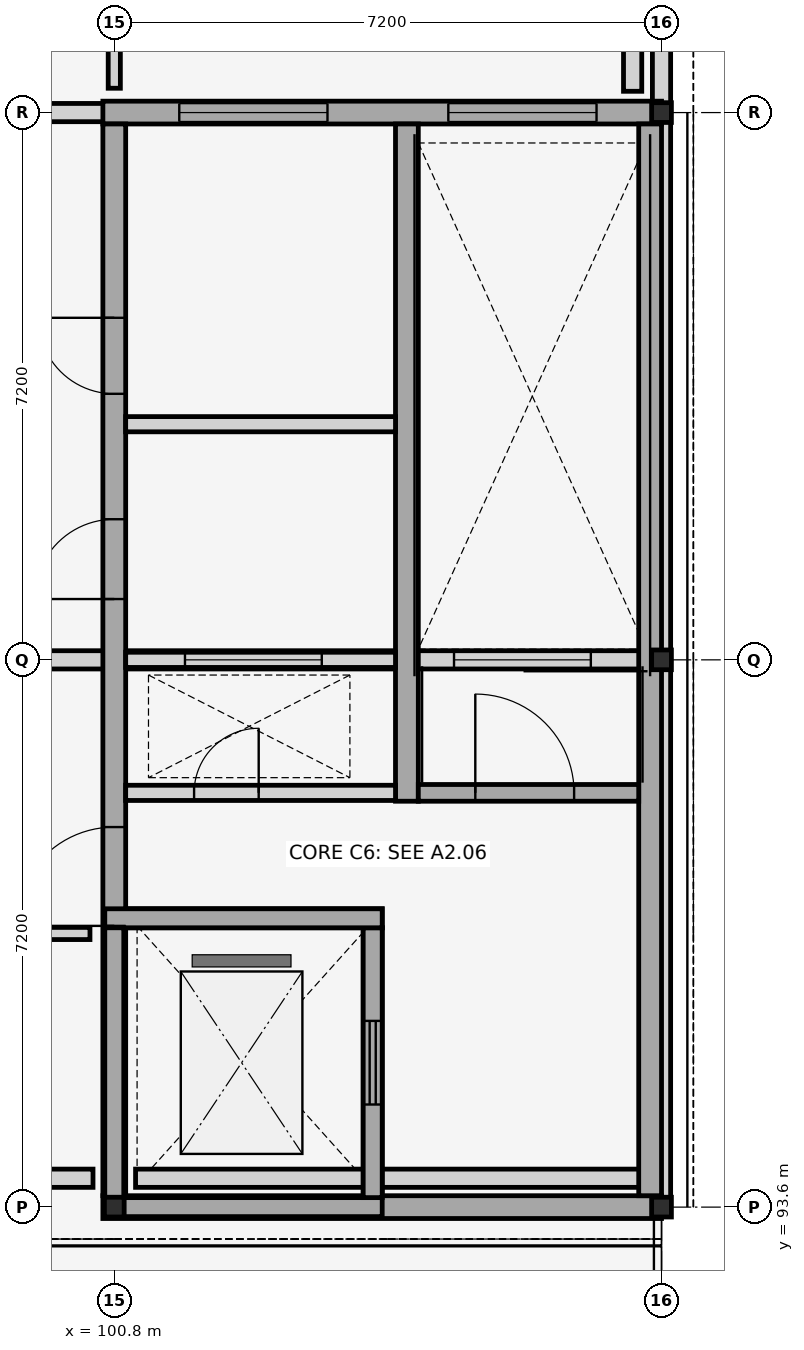
"""IFC4 building model, lengths in metres.
Left out: names, types, materials, properties, quantities, classifications, styles, units other than length and angle.
Written with IfcOpenShell. Run it as: python <this file> out.ifc"""

import sys

from ifc_helpers import new_model, si_unit, direction, frame, frame_2d, origin, origin_2d, place, context, subcontext, project, spatial, polyline, rectangle, i_section, outline, extrude, element, fill, save


model = new_model("IFC4")
c1 = context("Model", 3, precision=1e-05, world=origin(), true_north=direction((0.0, 1.0)))
c2 = subcontext(c1, "Body", "Model", "MODEL_VIEW")
j1 = project(units=[si_unit("LENGTHUNIT", "METRE"), si_unit("PLANEANGLEUNIT", "RADIAN")], contexts=[c1])
p1 = place(None, origin())
s1 = spatial("IfcSite", under=j1, at=p1, CompositionType="ELEMENT")
p2 = place(p1, origin())
s2 = spatial("IfcBuilding", under=s1, at=p2, CompositionType="ELEMENT")
p3 = place(p2, frame((0.0, 0.0, 25.2)))
s3 = spatial("IfcBuildingStorey", under=s2, at=p3, CompositionType="ELEMENT", Elevation=25.2)
for number, where, z_axis, x_axis in (
    (1, (100.8, 93.6, 0.0), (0.0, 0.0, 1.0), (1.0, 0.0, 0.0)),
    (2, (108.0, 93.6, 0.0), (0.0, 0.0, 1.0), (0.0, 1.0, 0.0)),
    (3, (108.0, 100.8, 0.0), (0.0, 0.0, 1.0), (1.0, 0.0, 0.0)),
    (4, (108.0, 108.0, 0.0), (0.0, 0.0, 1.0), (0.0, 1.0, 0.0)),
):
    element("IfcColumn", number, at=place(p3, frame(where, z_axis=z_axis, x_axis=x_axis)), inside=s3, PredefinedType="COLUMN", context=c2, shape_type="SweptSolid", body=[
        extrude(i_section(OverallWidth=0.26, OverallDepth=0.26, WebThickness=0.01, FlangeThickness=0.018, FilletRadius=0.024, at=origin_2d()), origin(), (0.0, 0.0, 1.0), 5.4),
    ])
p4 = place(p3, frame((93.88, 93.98, 0.0), z_axis=(0.0, 0.0, 1.0), x_axis=(1.0, 0.0, 0.0)))
e5 = element("IfcWall", 5, at=p4, inside=s3, PredefinedType="STANDARD", context=c2, shape_type="SweptSolid", body=[
    extrude(rectangle(XDim=6.64, YDim=0.24, at=frame_2d((3.32, 0.0))), origin(), (0.0, 0.0, 1.0), 4.78),
])
for number, where, z_axis, x_axis in (
    (6, (101.08, 93.98, 0.0), (0.0, 0.0, 1.0), (1.0, 0.0, 0.0)),
    (7, (107.62, 108.28, 0.0), (0.0, 0.0, 1.0), (0.0, 1.0, 0.0)),
):
    element("IfcWall", number, at=place(p3, frame(where, z_axis=z_axis, x_axis=x_axis)), inside=s3, PredefinedType="STANDARD", context=c2, shape_type="SweptSolid", body=[
        extrude(rectangle(XDim=6.64, YDim=0.24, at=frame_2d((3.32, 0.0))), origin(), (0.0, 0.0, 1.0), 4.78),
    ])
p5 = place(p3, frame((100.74, 100.8, 5.42), z_axis=(0.0, 0.0, 1.0), x_axis=(-1.0, 0.0, 0.0)))
e8 = element("IfcWall", 8, at=p5, inside=s3, PredefinedType="STANDARD", context=c2, shape_type="SweptSolid", body=[
    extrude(rectangle(XDim=7.08, YDim=0.24, at=frame_2d((3.54, 0.0))), origin(), (0.0, 0.0, 1.0), 6.46),
])
p6 = place(p5, frame((0.97, 0.0, 0.7)))
e9 = element("IfcOpeningElement", 9, at=p6, cuts=e8, PredefinedType="OPENING", context=c2, shape_type="SweptSolid", body=[
    extrude(rectangle(XDim=1.6, YDim=2.2, at=frame_2d((0.8, 1.1))), frame((0.0, 0.13, 0.0), z_axis=(0.0, -1.0, 0.0), x_axis=(1.0, 0.0, 0.0)), (0.0, 0.0, 1.0), 0.26),
])
p7 = place(p5, frame((4.51, 0.0, 0.7)))
e10 = element("IfcOpeningElement", 10, at=p7, cuts=e8, PredefinedType="OPENING", context=c2, shape_type="SweptSolid", body=[
    extrude(rectangle(XDim=1.6, YDim=2.2, at=frame_2d((0.8, 1.1))), frame((0.0, 0.13, 0.0), z_axis=(0.0, -1.0, 0.0), x_axis=(1.0, 0.0, 0.0)), (0.0, 0.0, 1.0), 0.26),
])
p8 = place(p3, frame((107.94, 100.8, 5.42), z_axis=(0.0, 0.0, 1.0), x_axis=(-1.0, 0.0, 0.0)))
e11 = element("IfcWall", 11, at=p8, inside=s3, PredefinedType="STANDARD", context=c2, shape_type="SweptSolid", body=[
    extrude(rectangle(XDim=7.08, YDim=0.24, at=frame_2d((3.54, 0.0))), origin(), (0.0, 0.0, 1.0), 6.46),
])
p9 = place(p8, frame((0.87, 0.0, 0.7)))
e12 = element("IfcOpeningElement", 12, at=p9, cuts=e11, PredefinedType="OPENING", context=c2, shape_type="SweptSolid", body=[
    extrude(rectangle(XDim=1.8, YDim=2.4, at=frame_2d((0.9, 1.2))), frame((0.0, 0.13, 0.0), z_axis=(0.0, -1.0, 0.0), x_axis=(1.0, 0.0, 0.0)), (0.0, 0.0, 1.0), 0.26),
])
p10 = place(p8, frame((4.41, 0.0, 0.7)))
e13 = element("IfcOpeningElement", 13, at=p10, cuts=e11, PredefinedType="OPENING", context=c2, shape_type="SweptSolid", body=[
    extrude(rectangle(XDim=1.8, YDim=2.4, at=frame_2d((0.9, 1.2))), frame((0.0, 0.13, 0.0), z_axis=(0.0, -1.0, 0.0), x_axis=(1.0, 0.0, 0.0)), (0.0, 0.0, 1.0), 0.26),
])
p11 = place(p3, frame((108.0, 93.6, 5.42), z_axis=(0.0, 0.0, 1.0), x_axis=(0.0, 1.0, 0.0)))
e14 = element("IfcWall", 14, at=p11, inside=s3, PredefinedType="STANDARD", context=c2, shape_type="SweptSolid", body=[
    extrude(outline(polyline([(0.0, 0.0), (7.2, 0.0), (7.2, 6.46), (0.0, 0.13), (0.0, 0.0)])), frame((0.0, 0.12, 0.0), z_axis=(0.0, -1.0, 0.0), x_axis=(1.0, 0.0, 0.0)), (0.0, 0.0, 1.0), 0.24),
])
p12 = place(p3, frame((100.74, 108.0, 5.42), z_axis=(0.0, 0.0, 1.0), x_axis=(-1.0, 0.0, 0.0)))
e15 = element("IfcWall", 15, at=p12, inside=s3, PredefinedType="STANDARD", context=c2, shape_type="SweptSolid", body=[
    extrude(rectangle(XDim=7.08, YDim=0.24, at=frame_2d((3.54, 0.0))), origin(), (0.0, 0.0, 1.0), 6.46),
])
p13 = place(p12, frame((0.87, 0.0, 0.7)))
e16 = element("IfcOpeningElement", 16, at=p13, cuts=e15, PredefinedType="OPENING", context=c2, shape_type="SweptSolid", body=[
    extrude(rectangle(XDim=1.8, YDim=2.4, at=frame_2d((0.9, 1.2))), frame((0.0, 0.13, 0.0), z_axis=(0.0, -1.0, 0.0), x_axis=(1.0, 0.0, 0.0)), (0.0, 0.0, 1.0), 0.26),
])
p14 = place(p12, frame((4.41, 0.0, 0.7)))
e17 = element("IfcOpeningElement", 17, at=p14, cuts=e15, PredefinedType="OPENING", context=c2, shape_type="SweptSolid", body=[
    extrude(rectangle(XDim=1.8, YDim=2.4, at=frame_2d((0.9, 1.2))), frame((0.0, 0.13, 0.0), z_axis=(0.0, -1.0, 0.0), x_axis=(1.0, 0.0, 0.0)), (0.0, 0.0, 1.0), 0.26),
])
p15 = place(p3, frame((107.94, 108.0, 5.42), z_axis=(0.0, 0.0, 1.0), x_axis=(-1.0, 0.0, 0.0)))
e18 = element("IfcWall", 18, at=p15, inside=s3, PredefinedType="STANDARD", context=c2, shape_type="SweptSolid", body=[
    extrude(rectangle(XDim=7.08, YDim=0.24, at=frame_2d((3.54, 0.0))), origin(), (0.0, 0.0, 1.0), 6.46),
])
p16 = place(p15, frame((0.795, 0.0, 0.7)))
e19 = element("IfcOpeningElement", 19, at=p16, cuts=e18, PredefinedType="OPENING", context=c2, shape_type="SweptSolid", body=[
    extrude(rectangle(XDim=1.95, YDim=2.5, at=frame_2d((0.975, 1.25))), frame((0.0, 0.13, 0.0), z_axis=(0.0, -1.0, 0.0), x_axis=(1.0, 0.0, 0.0)), (0.0, 0.0, 1.0), 0.26),
])
p17 = place(p15, frame((4.335, 0.0, 0.7)))
e20 = element("IfcOpeningElement", 20, at=p17, cuts=e18, PredefinedType="OPENING", context=c2, shape_type="SweptSolid", body=[
    extrude(rectangle(XDim=1.95, YDim=2.5, at=frame_2d((0.975, 1.25))), frame((0.0, 0.13, 0.0), z_axis=(0.0, -1.0, 0.0), x_axis=(1.0, 0.0, 0.0)), (0.0, 0.0, 1.0), 0.26),
])
for number, where, z_axis, x_axis in (
    (21, (108.0, 100.8, 5.42), (0.0, 0.0, 1.0), (0.0, 1.0, 0.0)),
    (22, (108.0, 108.0, 5.42), (0.0, 0.0, 1.0), (0.0, 1.0, 0.0)),
):
    element("IfcWall", number, at=place(p3, frame(where, z_axis=z_axis, x_axis=x_axis)), inside=s3, PredefinedType="STANDARD", context=c2, shape_type="SweptSolid", body=[
        extrude(outline(polyline([(0.0, 0.0), (7.2, 0.0), (7.2, 6.46), (0.0, 0.13), (0.0, 0.0)])), frame((0.0, 0.12, 0.0), z_axis=(0.0, -1.0, 0.0), x_axis=(1.0, 0.0, 0.0)), (0.0, 0.0, 1.0), 0.24),
    ])
for number, where, z_axis, x_axis in (
    (23, (100.65, 93.6, 0.0), (0.0, 0.0, 1.0), (1.0, 0.0, 0.0)),
    (24, (100.65, 108.0, 0.0), (0.0, 0.0, 1.0), (1.0, 0.0, 0.0)),
):
    element("IfcWall", number, at=place(p3, frame(where, z_axis=z_axis, x_axis=x_axis)), inside=s3, PredefinedType="SHEAR", context=c2, shape_type="SweptSolid", body=[
        extrude(rectangle(XDim=7.35, YDim=0.3, at=frame_2d((3.675, 0.0))), origin(), (0.0, 0.0, 1.0), 5.18),
    ])
p18 = place(p3, frame((107.85, 93.75, 0.0), z_axis=(0.0, 0.0, 1.0), x_axis=(0.0, 1.0, 0.0)))
e25 = element("IfcWall", 25, at=p18, inside=s3, PredefinedType="SHEAR", context=c2, shape_type="SweptSolid", body=[
    extrude(rectangle(XDim=14.1, YDim=0.3, at=frame_2d((7.05, 0.0))), origin(), (0.0, 0.0, 1.0), 5.18),
])
p19 = place(p3, frame((100.8, 93.75, 0.0), z_axis=(0.0, 0.0, 1.0), x_axis=(0.0, 1.0, 0.0)))
e26 = element("IfcWall", 26, at=p19, inside=s3, PredefinedType="SHEAR", context=c2, shape_type="SweptSolid", body=[
    extrude(rectangle(XDim=14.1, YDim=0.3, at=frame_2d((7.05, 0.0))), origin(), (0.0, 0.0, 1.0), 5.18),
])
p20 = place(p19, frame((3.55, 0.0, 0.0)))
e27 = element("IfcOpeningElement", 27, at=p20, cuts=e26, PredefinedType="OPENING", context=c2, shape_type="SweptSolid", body=[
    extrude(rectangle(XDim=1.3, YDim=2.2, at=frame_2d((0.65, 1.1))), frame((0.0, 0.16, 0.0), z_axis=(0.0, -1.0, 0.0), x_axis=(1.0, 0.0, 0.0)), (0.0, 0.0, 1.0), 0.32),
])
p21 = place(p19, frame((7.85, 0.0, 0.0)))
e28 = element("IfcOpeningElement", 28, at=p21, cuts=e26, PredefinedType="OPENING", context=c2, shape_type="SweptSolid", body=[
    extrude(rectangle(XDim=1.05, YDim=2.15, at=frame_2d((0.525, 1.075))), frame((0.0, 0.16, 0.0), z_axis=(0.0, -1.0, 0.0), x_axis=(1.0, 0.0, 0.0)), (0.0, 0.0, 1.0), 0.32),
])
p22 = place(p19, frame((10.55, 0.0, 0.0)))
e29 = element("IfcOpeningElement", 29, at=p22, cuts=e26, PredefinedType="OPENING", context=c2, shape_type="SweptSolid", body=[
    extrude(rectangle(XDim=1.0, YDim=2.15, at=frame_2d((0.5, 1.075))), frame((0.0, 0.16, 0.0), z_axis=(0.0, -1.0, 0.0), x_axis=(1.0, 0.0, 0.0)), (0.0, 0.0, 1.0), 0.32),
])
p23 = place(p3, frame((104.2, 93.75, 0.0), z_axis=(0.0, 0.0, 1.0), x_axis=(0.0, 1.0, 0.0)))
e30 = element("IfcWall", 30, at=p23, inside=s3, PredefinedType="SHEAR", context=c2, shape_type="SweptSolid", body=[
    extrude(rectangle(XDim=3.525, YDim=0.25, at=frame_2d((1.762, 0.0))), origin(), (0.0, 0.0, 1.0), 5.18),
])
p24 = place(p23, frame((1.2, 0.0, 0.0)))
e31 = element("IfcOpeningElement", 31, at=p24, cuts=e30, PredefinedType="OPENING", context=c2, shape_type="SweptSolid", body=[
    extrude(rectangle(XDim=1.1, YDim=2.15, at=frame_2d((0.55, 1.075))), frame((0.0, 0.135, 0.0), z_axis=(0.0, -1.0, 0.0), x_axis=(1.0, 0.0, 0.0)), (0.0, 0.0, 1.0), 0.27),
])
p25 = place(p3, frame((104.65, 98.94, 0.0), z_axis=(0.0, 0.0, 1.0), x_axis=(0.0, 1.0, 0.0)))
e32 = element("IfcWall", 32, at=p25, inside=s3, PredefinedType="SHEAR", context=c2, shape_type="SweptSolid", body=[
    extrude(rectangle(XDim=8.91, YDim=0.3, at=frame_2d((4.455, 0.0))), origin(), (0.0, 0.0, 1.0), 5.18),
])
p26 = place(p3, frame((100.95, 99.05, 0.0), z_axis=(0.0, 0.0, 1.0), x_axis=(1.0, 0.0, 0.0)))
e33 = element("IfcWall", 33, at=p26, inside=s3, PredefinedType="PLUMBINGWALL", context=c2, shape_type="SweptSolid", body=[
    extrude(rectangle(XDim=3.55, YDim=0.2, at=frame_2d((1.775, 0.0))), origin(), (0.0, 0.0, 1.0), 4.6),
])
p27 = place(p26, frame((0.9, 0.0, 0.0)))
e34 = element("IfcOpeningElement", 34, at=p27, cuts=e33, PredefinedType="OPENING", context=c2, shape_type="SweptSolid", body=[
    extrude(rectangle(XDim=0.85, YDim=2.05, at=frame_2d((0.425, 1.025))), frame((0.0, 0.11, 0.0), z_axis=(0.0, -1.0, 0.0), x_axis=(1.0, 0.0, 0.0)), (0.0, 0.0, 1.0), 0.22),
])
p28 = place(p3, frame((104.8, 99.05, 0.0), z_axis=(0.0, 0.0, 1.0), x_axis=(1.0, 0.0, 0.0)))
e35 = element("IfcWall", 35, at=p28, inside=s3, PredefinedType="SHEAR", context=c2, shape_type="SweptSolid", body=[
    extrude(rectangle(XDim=2.9, YDim=0.22, at=frame_2d((1.45, 0.0))), origin(), (0.0, 0.0, 1.0), 5.18),
])
p29 = place(p28, frame((0.75, 0.0, 0.0)))
e36 = element("IfcOpeningElement", 36, at=p29, cuts=e35, PredefinedType="OPENING", context=c2, shape_type="SweptSolid", body=[
    extrude(rectangle(XDim=1.3, YDim=2.2, at=frame_2d((0.65, 1.1))), frame((0.0, 0.12, 0.0), z_axis=(0.0, -1.0, 0.0), x_axis=(1.0, 0.0, 0.0)), (0.0, 0.0, 1.0), 0.24),
])
p30 = place(p3, frame((100.95, 97.4, 0.0), z_axis=(0.0, 0.0, 1.0), x_axis=(1.0, 0.0, 0.0)))
e37 = element("IfcWall", 37, at=p30, inside=s3, PredefinedType="SHEAR", context=c2, shape_type="SweptSolid", body=[
    extrude(rectangle(XDim=3.375, YDim=0.25, at=frame_2d((1.688, 0.0))), origin(), (0.0, 0.0, 1.0), 5.18),
])
for number, where, z_axis, x_axis in (
    (38, (100.95, 100.8, 0.0), (0.0, 0.0, 1.0), (1.0, 0.0, 0.0)),
    (39, (100.95, 103.9, 0.0), (0.0, 0.0, 1.0), (1.0, 0.0, 0.0)),
):
    element("IfcWall", number, at=place(p3, frame(where, z_axis=z_axis, x_axis=x_axis)), inside=s3, PredefinedType="PLUMBINGWALL", context=c2, shape_type="SweptSolid", body=[
        extrude(rectangle(XDim=3.55, YDim=0.2, at=frame_2d((1.775, 0.0))), origin(), (0.0, 0.0, 1.0), 4.6),
    ])
p31 = place(p3, frame((100.675, 93.6, 5.18), z_axis=(0.0, 0.0, 1.0), x_axis=(1.0, 0.0, 0.0)))
e40 = element("IfcWall", 40, at=p31, inside=s3, PredefinedType="SHEAR", context=c2, shape_type="SweptSolid", body=[
    extrude(rectangle(XDim=3.65, YDim=0.25, at=frame_2d((1.825, 0.0))), origin(), (0.0, 0.0, 1.0), 1.72),
])
p32 = place(p3, frame((104.2, 93.725, 5.18), z_axis=(0.0, 0.0, 1.0), x_axis=(0.0, 1.0, 0.0)))
e41 = element("IfcWall", 41, at=p32, inside=s3, PredefinedType="SHEAR", context=c2, shape_type="SweptSolid", body=[
    extrude(rectangle(XDim=3.55, YDim=0.25, at=frame_2d((1.775, 0.0))), origin(), (0.0, 0.0, 1.0), 1.72),
])
p33 = place(p3, frame((104.325, 97.4, 5.18), z_axis=(0.0, 0.0, 1.0), x_axis=(-1.0, 0.0, 0.0)))
e42 = element("IfcWall", 42, at=p33, inside=s3, PredefinedType="SHEAR", context=c2, shape_type="SweptSolid", body=[
    extrude(rectangle(XDim=3.65, YDim=0.25, at=frame_2d((1.825, 0.0))), origin(), (0.0, 0.0, 1.0), 1.72),
])
p34 = place(p3, frame((100.8, 97.275, 5.18), z_axis=(0.0, 0.0, 1.0), x_axis=(0.0, -1.0, 0.0)))
e43 = element("IfcWall", 43, at=p34, inside=s3, PredefinedType="SHEAR", context=c2, shape_type="SweptSolid", body=[
    extrude(rectangle(XDim=3.55, YDim=0.25, at=frame_2d((1.775, 0.0))), origin(), (0.0, 0.0, 1.0), 1.72),
])
p35 = place(p3, frame((100.8, 108.32, 0.0), z_axis=(0.0, 0.0, 1.0), x_axis=(0.0, 1.0, 0.0)))
e44 = element("IfcWall", 44, at=p35, inside=s3, PredefinedType="PARTITIONING", context=c2, shape_type="SweptSolid", body=[
    extrude(rectangle(XDim=6.56, YDim=0.16, at=frame_2d((3.28, 0.0))), origin(), (0.0, 0.0, 1.0), 4.35),
])
p36 = place(p35, frame((2.155, 0.0, 0.0)))
e45 = element("IfcOpeningElement", 45, at=p36, cuts=e44, PredefinedType="OPENING", context=c2, shape_type="SweptSolid", body=[
    extrude(rectangle(XDim=2.25, YDim=2.7, at=frame_2d((1.125, 1.35))), frame((0.0, 0.09, 0.0), z_axis=(0.0, -1.0, 0.0), x_axis=(1.0, 0.0, 0.0)), (0.0, 0.0, 1.0), 0.18),
])
p37 = place(p3, frame((86.72, 97.2, 0.0), z_axis=(0.0, 0.0, 1.0), x_axis=(1.0, 0.0, 0.0)))
e46 = element("IfcWall", 46, at=p37, inside=s3, PredefinedType="PARTITIONING", context=c2, shape_type="SweptSolid", body=[
    extrude(rectangle(XDim=13.76, YDim=0.16, at=frame_2d((6.88, 0.0))), origin(), (0.0, 0.0, 1.0), 4.35),
])
p38 = place(p37, frame((1.752, 0.0, 0.0)))
e47 = element("IfcOpeningElement", 47, at=p38, cuts=e46, PredefinedType="OPENING", context=c2, shape_type="SweptSolid", body=[
    extrude(rectangle(XDim=1.5, YDim=2.25, at=frame_2d((0.75, 1.125))), frame((0.0, 0.09, 0.0), z_axis=(0.0, -1.0, 0.0), x_axis=(1.0, 0.0, 0.0)), (0.0, 0.0, 1.0), 0.18),
])
p39 = place(p9, origin())
e48 = element("IfcWindow", 48, at=p39, inside=s3, PartitioningType="SINGLE_PANEL", PredefinedType="SKYLIGHT", context=c2, shape_type="SweptSolid", body=[
    extrude(rectangle(XDim=1.8, YDim=2.4, at=frame_2d((0.9, 1.2))), frame((0.0, 0.03, 0.0), z_axis=(0.0, -1.0, 0.0), x_axis=(1.0, 0.0, 0.0)), (0.0, 0.0, 1.0), 0.06),
])
fill(e12, e48)
p40 = place(p10, origin())
e49 = element("IfcWindow", 49, at=p40, inside=s3, PartitioningType="SINGLE_PANEL", PredefinedType="SKYLIGHT", context=c2, shape_type="SweptSolid", body=[
    extrude(rectangle(XDim=1.8, YDim=2.4, at=frame_2d((0.9, 1.2))), frame((0.0, 0.03, 0.0), z_axis=(0.0, -1.0, 0.0), x_axis=(1.0, 0.0, 0.0)), (0.0, 0.0, 1.0), 0.06),
])
fill(e13, e49)
p41 = place(p16, origin())
e50 = element("IfcWindow", 50, at=p41, inside=s3, PartitioningType="SINGLE_PANEL", PredefinedType="SKYLIGHT", context=c2, shape_type="SweptSolid", body=[
    extrude(rectangle(XDim=1.95, YDim=2.5, at=frame_2d((0.975, 1.25))), frame((0.0, 0.03, 0.0), z_axis=(0.0, -1.0, 0.0), x_axis=(1.0, 0.0, 0.0)), (0.0, 0.0, 1.0), 0.06),
])
fill(e19, e50)
p42 = place(p17, origin())
e51 = element("IfcWindow", 51, at=p42, inside=s3, PartitioningType="SINGLE_PANEL", PredefinedType="SKYLIGHT", context=c2, shape_type="SweptSolid", body=[
    extrude(rectangle(XDim=1.95, YDim=2.5, at=frame_2d((0.975, 1.25))), frame((0.0, 0.03, 0.0), z_axis=(0.0, -1.0, 0.0), x_axis=(1.0, 0.0, 0.0)), (0.0, 0.0, 1.0), 0.06),
])
fill(e20, e51)
p43 = place(p20, origin())
e52 = element("IfcDoor", 52, at=p43, inside=s3, OperationType="SINGLE_SWING_LEFT", PredefinedType="DOOR", context=c2, shape_type="SweptSolid", body=[
    extrude(rectangle(XDim=1.3, YDim=2.2, at=frame_2d((0.65, 1.1))), frame((0.0, 0.025, 0.0), z_axis=(0.0, -1.0, 0.0), x_axis=(1.0, 0.0, 0.0)), (0.0, 0.0, 1.0), 0.05),
])
fill(e27, e52)
p44 = place(p21, origin())
e53 = element("IfcDoor", 53, at=p44, inside=s3, OperationType="SINGLE_SWING_LEFT", PredefinedType="DOOR", context=c2, shape_type="SweptSolid", body=[
    extrude(rectangle(XDim=1.05, YDim=2.15, at=frame_2d((0.525, 1.075))), frame((0.0, 0.025, 0.0), z_axis=(0.0, -1.0, 0.0), x_axis=(1.0, 0.0, 0.0)), (0.0, 0.0, 1.0), 0.05),
])
fill(e28, e53)
p45 = place(p22, origin())
e54 = element("IfcDoor", 54, at=p45, inside=s3, OperationType="SINGLE_SWING_RIGHT", PredefinedType="DOOR", context=c2, shape_type="SweptSolid", body=[
    extrude(rectangle(XDim=1.0, YDim=2.15, at=frame_2d((0.5, 1.075))), frame((0.0, 0.025, 0.0), z_axis=(0.0, -1.0, 0.0), x_axis=(1.0, 0.0, 0.0)), (0.0, 0.0, 1.0), 0.05),
])
fill(e29, e54)
p46 = place(p24, origin())
e55 = element("IfcDoor", 55, at=p46, inside=s3, OperationType="SLIDING_TO_LEFT", PredefinedType="DOOR", context=c2, shape_type="SweptSolid", body=[
    extrude(rectangle(XDim=1.1, YDim=2.15, at=frame_2d((0.55, 1.075))), frame((0.0, 0.025, 0.0), z_axis=(0.0, -1.0, 0.0), x_axis=(1.0, 0.0, 0.0)), (0.0, 0.0, 1.0), 0.05),
])
fill(e31, e55)
p47 = place(p27, origin())
e56 = element("IfcDoor", 56, at=p47, inside=s3, OperationType="SINGLE_SWING_RIGHT", PredefinedType="TRAPDOOR", context=c2, shape_type="SweptSolid", body=[
    extrude(rectangle(XDim=0.85, YDim=2.05, at=frame_2d((0.425, 1.025))), frame((0.0, 0.025, 0.0), z_axis=(0.0, -1.0, 0.0), x_axis=(1.0, 0.0, 0.0)), (0.0, 0.0, 1.0), 0.05),
])
fill(e34, e56)
p48 = place(p29, origin())
e57 = element("IfcDoor", 57, at=p48, inside=s3, OperationType="SINGLE_SWING_LEFT", PredefinedType="DOOR", context=c2, shape_type="SweptSolid", body=[
    extrude(rectangle(XDim=1.3, YDim=2.2, at=frame_2d((0.65, 1.1))), frame((0.0, 0.025, 0.0), z_axis=(0.0, -1.0, 0.0), x_axis=(1.0, 0.0, 0.0)), (0.0, 0.0, 1.0), 0.05),
])
fill(e36, e57)
save(model, sys.argv[1])
